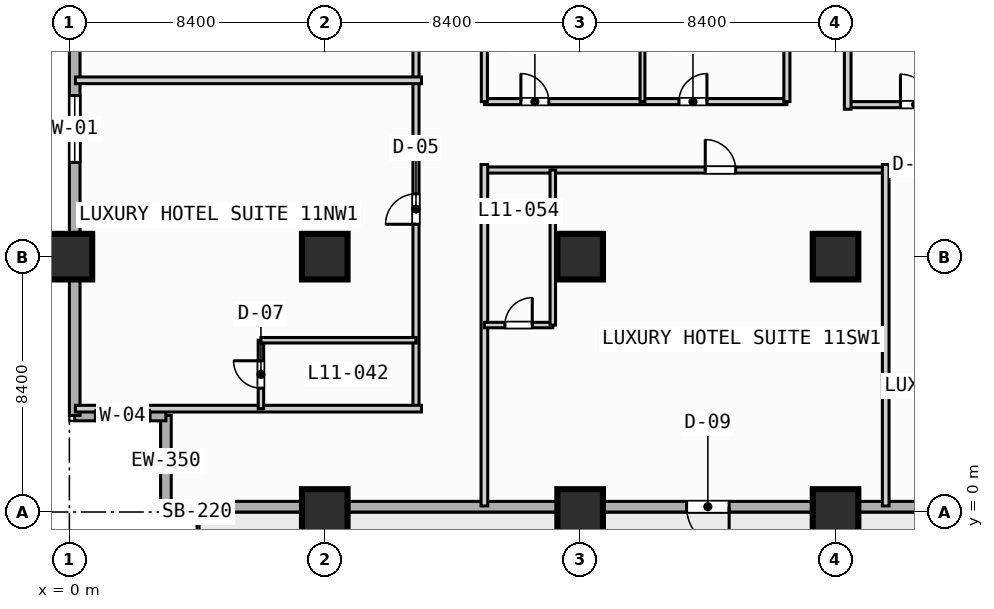
"""IFC4 building model, lengths in metres.
Left out: names, types, materials, properties, quantities, classifications, styles, units other than length and angle.
Written with IfcOpenShell. Run it as: python <this file> out.ifc"""

import sys

from ifc_helpers import new_model, si_unit, direction, frame, frame_2d, origin, origin_2d, place, context, subcontext, project, spatial, rectangle, extrude, element, fill, save


model = new_model("IFC4")
c1 = context("Model", 3, precision=1e-05, world=origin(), true_north=direction((0.0, 1.0)))
c2 = subcontext(c1, "Body", "Model", "MODEL_VIEW")
j1 = project(units=[si_unit("LENGTHUNIT", "METRE"), si_unit("PLANEANGLEUNIT", "RADIAN")], contexts=[c1])
p1 = place(None, origin())
s1 = spatial("IfcSite", under=j1, at=p1, CompositionType="ELEMENT")
p2 = place(p1, origin())
s2 = spatial("IfcBuilding", under=s1, at=p2, CompositionType="ELEMENT")
p3 = place(p2, frame((0.0, 0.0, 51.0)))
s3 = spatial("IfcBuildingStorey", under=s2, at=p3, CompositionType="ELEMENT", Elevation=51.0)
for number, where, z_axis, x_axis in (
    (1, (0.0, 8.4, 0.0), (0.0, 0.0, 1.0), (1.0, 0.0, 0.0)),
    (2, (8.4, 0.0, 0.0), (0.0, 0.0, 1.0), (1.0, 0.0, 0.0)),
    (3, (8.4, 8.4, 0.0), (0.0, 0.0, 1.0), (1.0, 0.0, 0.0)),
    (4, (16.8, 0.0, 0.0), (0.0, 0.0, 1.0), (1.0, 0.0, 0.0)),
    (5, (16.8, 8.4, 0.0), (0.0, 0.0, 1.0), (1.0, 0.0, 0.0)),
    (6, (25.2, 0.0, 0.0), (0.0, 0.0, 1.0), (1.0, 0.0, 0.0)),
    (7, (25.2, 8.4, 0.0), (0.0, 0.0, 1.0), (1.0, 0.0, 0.0)),
):
    element("IfcColumn", number, at=place(p3, frame(where, z_axis=z_axis, x_axis=x_axis)), inside=s3, PredefinedType="COLUMN", context=c2, shape_type="SweptSolid", body=[
        extrude(rectangle(XDim=1.5, YDim=1.5, at=origin_2d()), origin(), (0.0, 0.0, 1.0), 3.8),
    ])
p4 = place(p3, frame((3.175, 0.175, 0.0), z_axis=(0.0, 0.0, 1.0), x_axis=(0.0, 1.0, 0.0)))
e8 = element("IfcWall", 8, at=p4, inside=s3, PredefinedType="STANDARD", context=c2, shape_type="SweptSolid", body=[
    extrude(rectangle(XDim=3.0, YDim=0.35, at=frame_2d((1.5, 0.0))), origin(), (0.0, 0.0, 1.0), 3.55),
])
p5 = place(p3, frame((3.175, 3.175, 0.0), z_axis=(0.0, 0.0, 1.0), x_axis=(-1.0, 0.0, 0.0)))
e9 = element("IfcWall", 9, at=p5, inside=s3, PredefinedType="STANDARD", context=c2, shape_type="SweptSolid", body=[
    extrude(rectangle(XDim=3.0, YDim=0.35, at=frame_2d((1.5, 0.0))), origin(), (0.0, 0.0, 1.0), 3.55),
])
p6 = place(p5, frame((0.522, 0.0, 0.85)))
e10 = element("IfcOpeningElement", 10, at=p6, cuts=e9, PredefinedType="OPENING", context=c2, shape_type="SweptSolid", body=[
    extrude(rectangle(XDim=1.8, YDim=1.8, at=frame_2d((0.9, 0.9))), frame((0.0, 0.185, 0.0), z_axis=(0.0, -1.0, 0.0), x_axis=(1.0, 0.0, 0.0)), (0.0, 0.0, 1.0), 0.37),
])
p7 = place(p3, frame((0.175, 3.175, 0.0), z_axis=(0.0, 0.0, 1.0), x_axis=(0.0, 1.0, 0.0)))
e11 = element("IfcWall", 11, at=p7, inside=s3, PredefinedType="STANDARD", context=c2, shape_type="SweptSolid", body=[
    extrude(rectangle(XDim=86.05, YDim=0.35, at=frame_2d((43.025, 0.0))), origin(), (0.0, 0.0, 1.0), 3.55),
])
p8 = place(p7, frame((42.325, 0.0, 0.0)))
e12 = element("IfcOpeningElement", 12, at=p8, cuts=e11, PredefinedType="OPENING", context=c2, shape_type="SweptSolid", body=[
    extrude(rectangle(XDim=1.4, YDim=2.2, at=frame_2d((0.7, 1.1))), frame((0.0, 0.185, 0.0), z_axis=(0.0, -1.0, 0.0), x_axis=(1.0, 0.0, 0.0)), (0.0, 0.0, 1.0), 0.37),
])
p9 = place(p7, frame((8.325, 0.0, 0.85)))
e13 = element("IfcOpeningElement", 13, at=p9, cuts=e11, PredefinedType="OPENING", context=c2, shape_type="SweptSolid", body=[
    extrude(rectangle(XDim=2.2, YDim=1.8, at=frame_2d((1.1, 0.9))), frame((0.0, 0.185, 0.0), z_axis=(0.0, -1.0, 0.0), x_axis=(1.0, 0.0, 0.0)), (0.0, 0.0, 1.0), 0.37),
])
p10 = place(p7, frame((16.725, 0.0, 0.85)))
e14 = element("IfcOpeningElement", 14, at=p10, cuts=e11, PredefinedType="OPENING", context=c2, shape_type="SweptSolid", body=[
    extrude(rectangle(XDim=2.2, YDim=1.8, at=frame_2d((1.1, 0.9))), frame((0.0, 0.185, 0.0), z_axis=(0.0, -1.0, 0.0), x_axis=(1.0, 0.0, 0.0)), (0.0, 0.0, 1.0), 0.37),
])
p11 = place(p7, frame((25.125, 0.0, 0.85)))
e15 = element("IfcOpeningElement", 15, at=p11, cuts=e11, PredefinedType="OPENING", context=c2, shape_type="SweptSolid", body=[
    extrude(rectangle(XDim=2.2, YDim=1.8, at=frame_2d((1.1, 0.9))), frame((0.0, 0.185, 0.0), z_axis=(0.0, -1.0, 0.0), x_axis=(1.0, 0.0, 0.0)), (0.0, 0.0, 1.0), 0.37),
])
p12 = place(p7, frame((33.525, 0.0, 0.85)))
e16 = element("IfcOpeningElement", 16, at=p12, cuts=e11, PredefinedType="OPENING", context=c2, shape_type="SweptSolid", body=[
    extrude(rectangle(XDim=2.2, YDim=1.8, at=frame_2d((1.1, 0.9))), frame((0.0, 0.185, 0.0), z_axis=(0.0, -1.0, 0.0), x_axis=(1.0, 0.0, 0.0)), (0.0, 0.0, 1.0), 0.37),
])
p13 = place(p7, frame((56.675, 0.0, 0.85)))
e17 = element("IfcOpeningElement", 17, at=p13, cuts=e11, PredefinedType="OPENING", context=c2, shape_type="SweptSolid", body=[
    extrude(rectangle(XDim=1.8, YDim=1.8, at=frame_2d((0.9, 0.9))), frame((0.0, 0.185, 0.0), z_axis=(0.0, -1.0, 0.0), x_axis=(1.0, 0.0, 0.0)), (0.0, 0.0, 1.0), 0.37),
])
p14 = place(p3, frame((89.225, 0.175, 0.0), z_axis=(0.0, 0.0, 1.0), x_axis=(-1.0, 0.0, 0.0)))
e18 = element("IfcWall", 18, at=p14, inside=s3, PredefinedType="STANDARD", context=c2, shape_type="SweptSolid", body=[
    extrude(rectangle(XDim=86.05, YDim=0.35, at=frame_2d((43.025, 0.0))), origin(), (0.0, 0.0, 1.0), 3.55),
])
p15 = place(p14, frame((67.525, 0.0, 0.0)))
e19 = element("IfcOpeningElement", 19, at=p15, cuts=e18, PredefinedType="OPENING", context=c2, shape_type="SweptSolid", body=[
    extrude(rectangle(XDim=1.4, YDim=2.2, at=frame_2d((0.7, 1.1))), frame((0.0, 0.185, 0.0), z_axis=(0.0, -1.0, 0.0), x_axis=(1.0, 0.0, 0.0)), (0.0, 0.0, 1.0), 0.37),
])
p16 = place(p14, frame((58.725, 0.0, 0.85)))
e20 = element("IfcOpeningElement", 20, at=p16, cuts=e18, PredefinedType="OPENING", context=c2, shape_type="SweptSolid", body=[
    extrude(rectangle(XDim=2.2, YDim=1.8, at=frame_2d((1.1, 0.9))), frame((0.0, 0.185, 0.0), z_axis=(0.0, -1.0, 0.0), x_axis=(1.0, 0.0, 0.0)), (0.0, 0.0, 1.0), 0.37),
])
p17 = place(p14, frame((41.925, 0.0, 0.85)))
e21 = element("IfcOpeningElement", 21, at=p17, cuts=e18, PredefinedType="OPENING", context=c2, shape_type="SweptSolid", body=[
    extrude(rectangle(XDim=2.2, YDim=1.8, at=frame_2d((1.1, 0.9))), frame((0.0, 0.185, 0.0), z_axis=(0.0, -1.0, 0.0), x_axis=(1.0, 0.0, 0.0)), (0.0, 0.0, 1.0), 0.37),
])
p18 = place(p14, frame((33.525, 0.0, 0.85)))
e22 = element("IfcOpeningElement", 22, at=p18, cuts=e18, PredefinedType="OPENING", context=c2, shape_type="SweptSolid", body=[
    extrude(rectangle(XDim=2.2, YDim=1.8, at=frame_2d((1.1, 0.9))), frame((0.0, 0.185, 0.0), z_axis=(0.0, -1.0, 0.0), x_axis=(1.0, 0.0, 0.0)), (0.0, 0.0, 1.0), 0.37),
])
p19 = place(p14, frame((16.725, 0.0, 0.85)))
e23 = element("IfcOpeningElement", 23, at=p19, cuts=e18, PredefinedType="OPENING", context=c2, shape_type="SweptSolid", body=[
    extrude(rectangle(XDim=2.2, YDim=1.8, at=frame_2d((1.1, 0.9))), frame((0.0, 0.185, 0.0), z_axis=(0.0, -1.0, 0.0), x_axis=(1.0, 0.0, 0.0)), (0.0, 0.0, 1.0), 0.37),
])
p20 = place(p14, frame((8.325, 0.0, 0.85)))
e24 = element("IfcOpeningElement", 24, at=p20, cuts=e18, PredefinedType="OPENING", context=c2, shape_type="SweptSolid", body=[
    extrude(rectangle(XDim=2.2, YDim=1.8, at=frame_2d((1.1, 0.9))), frame((0.0, 0.185, 0.0), z_axis=(0.0, -1.0, 0.0), x_axis=(1.0, 0.0, 0.0)), (0.0, 0.0, 1.0), 0.37),
])
p21 = place(p3, frame((13.65, 13.5, 0.0), z_axis=(0.0, 0.0, 1.0), x_axis=(1.0, 0.0, 0.0)))
e25 = element("IfcWall", 25, at=p21, inside=s3, PredefinedType="PARTITIONING", context=c2, shape_type="SweptSolid", body=[
    extrude(rectangle(XDim=9.95, YDim=0.2, at=frame_2d((4.975, 0.0))), origin(), (0.0, 0.0, 1.0), 3.55),
])
p22 = place(p21, frame((1.2, 0.0, 0.0)))
e26 = element("IfcOpeningElement", 26, at=p22, cuts=e25, PredefinedType="OPENING", context=c2, shape_type="SweptSolid", body=[
    extrude(rectangle(XDim=0.92, YDim=2.1, at=frame_2d((0.46, 1.05))), frame((0.0, 0.11, 0.0), z_axis=(0.0, -1.0, 0.0), x_axis=(1.0, 0.0, 0.0)), (0.0, 0.0, 1.0), 0.22),
])
p23 = place(p21, frame((6.4, 0.0, 0.0)))
e27 = element("IfcOpeningElement", 27, at=p23, cuts=e25, PredefinedType="OPENING", context=c2, shape_type="SweptSolid", body=[
    extrude(rectangle(XDim=0.92, YDim=2.1, at=frame_2d((0.46, 1.05))), frame((0.0, 0.11, 0.0), z_axis=(0.0, -1.0, 0.0), x_axis=(1.0, 0.0, 0.0)), (0.0, 0.0, 1.0), 0.22),
])
p24 = place(p3, frame((18.85, 13.5, 0.0), z_axis=(0.0, 0.0, 1.0), x_axis=(0.0, 1.0, 0.0)))
e28 = element("IfcWall", 28, at=p24, inside=s3, PredefinedType="PARTITIONING", context=c2, shape_type="SweptSolid", body=[
    extrude(rectangle(XDim=11.5, YDim=0.16, at=frame_2d((5.75, 0.0))), origin(), (0.0, 0.0, 1.0), 3.55),
])
for number, where, z_axis, x_axis in (
    (29, (13.65, 13.5, 0.0), (0.0, 0.0, 1.0), (0.0, 1.0, 0.0)),
    (30, (23.6, 13.5, 0.0), (0.0, 0.0, 1.0), (0.0, 1.0, 0.0)),
):
    element("IfcWall", number, at=place(p3, frame(where, z_axis=z_axis, x_axis=x_axis)), inside=s3, PredefinedType="PARTITIONING", context=c2, shape_type="SweptSolid", body=[
        extrude(rectangle(XDim=11.5, YDim=0.2, at=frame_2d((5.75, 0.0))), origin(), (0.0, 0.0, 1.0), 3.55),
    ])
p25 = place(p3, frame((25.6, 13.4, 0.0), z_axis=(0.0, 0.0, 1.0), x_axis=(1.0, 0.0, 0.0)))
e31 = element("IfcWall", 31, at=p25, inside=s3, PredefinedType="PARTITIONING", context=c2, shape_type="SweptSolid", body=[
    extrude(rectangle(XDim=13.6, YDim=0.2, at=frame_2d((6.8, 0.0))), origin(), (0.0, 0.0, 1.0), 3.55),
])
p26 = place(p25, frame((1.735, 0.0, 0.0)))
e32 = element("IfcOpeningElement", 32, at=p26, cuts=e31, PredefinedType="OPENING", context=c2, shape_type="SweptSolid", body=[
    extrude(rectangle(XDim=1.0, YDim=2.15, at=frame_2d((0.5, 1.075))), frame((0.0, 0.11, 0.0), z_axis=(0.0, -1.0, 0.0), x_axis=(1.0, 0.0, 0.0)), (0.0, 0.0, 1.0), 0.22),
])
p27 = place(p25, frame((8.535, 0.0, 0.0)))
e33 = element("IfcOpeningElement", 33, at=p27, cuts=e31, PredefinedType="OPENING", context=c2, shape_type="SweptSolid", body=[
    extrude(rectangle(XDim=1.0, YDim=2.15, at=frame_2d((0.5, 1.075))), frame((0.0, 0.11, 0.0), z_axis=(0.0, -1.0, 0.0), x_axis=(1.0, 0.0, 0.0)), (0.0, 0.0, 1.0), 0.22),
])
p28 = place(p3, frame((25.6, 13.25, 0.0), z_axis=(0.0, 0.0, 1.0), x_axis=(0.0, 1.0, 0.0)))
e34 = element("IfcWall", 34, at=p28, inside=s3, PredefinedType="PARTITIONING", context=c2, shape_type="SweptSolid", body=[
    extrude(rectangle(XDim=20.18, YDim=0.22, at=frame_2d((10.09, 0.0))), origin(), (0.0, 0.0, 1.0), 3.55),
])
p29 = place(p3, frame((11.4, 3.4, 0.0), z_axis=(0.0, 0.0, 1.0), x_axis=(0.0, 1.0, 0.0)))
e35 = element("IfcWall", 35, at=p29, inside=s3, PredefinedType="PARTITIONING", context=c2, shape_type="SweptSolid", body=[
    extrude(rectangle(XDim=60.4, YDim=0.2, at=frame_2d((30.2, 0.0))), origin(), (0.0, 0.0, 1.0), 3.55),
])
p30 = place(p29, frame((6.065, 0.0, 0.0)))
e36 = element("IfcOpeningElement", 36, at=p30, cuts=e35, PredefinedType="OPENING", context=c2, shape_type="SweptSolid", body=[
    extrude(rectangle(XDim=1.0, YDim=2.15, at=frame_2d((0.5, 1.075))), frame((0.0, 0.11, 0.0), z_axis=(0.0, -1.0, 0.0), x_axis=(1.0, 0.0, 0.0)), (0.0, 0.0, 1.0), 0.22),
])
p31 = place(p29, frame((13.735, 0.0, 0.0)))
e37 = element("IfcOpeningElement", 37, at=p31, cuts=e35, PredefinedType="OPENING", context=c2, shape_type="SweptSolid", body=[
    extrude(rectangle(XDim=1.0, YDim=2.15, at=frame_2d((0.5, 1.075))), frame((0.0, 0.11, 0.0), z_axis=(0.0, -1.0, 0.0), x_axis=(1.0, 0.0, 0.0)), (0.0, 0.0, 1.0), 0.22),
])
p32 = place(p29, frame((22.96, 0.0, 0.0)))
e38 = element("IfcOpeningElement", 38, at=p32, cuts=e35, PredefinedType="OPENING", context=c2, shape_type="SweptSolid", body=[
    extrude(rectangle(XDim=1.0, YDim=2.15, at=frame_2d((0.5, 1.075))), frame((0.0, 0.11, 0.0), z_axis=(0.0, -1.0, 0.0), x_axis=(1.0, 0.0, 0.0)), (0.0, 0.0, 1.0), 0.22),
])
p33 = place(p29, frame((31.785, 0.0, 0.0)))
e39 = element("IfcOpeningElement", 39, at=p33, cuts=e35, PredefinedType="OPENING", context=c2, shape_type="SweptSolid", body=[
    extrude(rectangle(XDim=1.0, YDim=2.15, at=frame_2d((0.5, 1.075))), frame((0.0, 0.11, 0.0), z_axis=(0.0, -1.0, 0.0), x_axis=(1.0, 0.0, 0.0)), (0.0, 0.0, 1.0), 0.22),
])
p34 = place(p29, frame((42.56, 0.0, 0.0)))
e40 = element("IfcOpeningElement", 40, at=p34, cuts=e35, PredefinedType="OPENING", context=c2, shape_type="SweptSolid", body=[
    extrude(rectangle(XDim=1.0, YDim=2.15, at=frame_2d((0.5, 1.075))), frame((0.0, 0.11, 0.0), z_axis=(0.0, -1.0, 0.0), x_axis=(1.0, 0.0, 0.0)), (0.0, 0.0, 1.0), 0.22),
])
p35 = place(p29, frame((53.935, 0.0, 0.0)))
e41 = element("IfcOpeningElement", 41, at=p35, cuts=e35, PredefinedType="OPENING", context=c2, shape_type="SweptSolid", body=[
    extrude(rectangle(XDim=1.0, YDim=2.15, at=frame_2d((0.5, 1.075))), frame((0.0, 0.11, 0.0), z_axis=(0.0, -1.0, 0.0), x_axis=(1.0, 0.0, 0.0)), (0.0, 0.0, 1.0), 0.22),
])
p36 = place(p3, frame((0.2, 3.4, 0.0), z_axis=(0.0, 0.0, 1.0), x_axis=(1.0, 0.0, 0.0)))
e42 = element("IfcWall", 42, at=p36, inside=s3, PredefinedType="PARTITIONING", context=c2, shape_type="SweptSolid", body=[
    extrude(rectangle(XDim=11.38, YDim=0.22, at=frame_2d((5.69, 0.0))), origin(), (0.0, 0.0, 1.0), 3.55),
])
p37 = place(p3, frame((6.3, 3.4, 0.0), z_axis=(0.0, 0.0, 1.0), x_axis=(0.0, 1.0, 0.0)))
e43 = element("IfcWall", 43, at=p37, inside=s3, PredefinedType="PLUMBINGWALL", context=c2, shape_type="SweptSolid", body=[
    extrude(rectangle(XDim=2.25, YDim=0.18, at=frame_2d((1.125, 0.0))), origin(), (0.0, 0.0, 1.0), 3.55),
])
p38 = place(p37, frame((0.675, 0.0, 0.0)))
e44 = element("IfcOpeningElement", 44, at=p38, cuts=e43, PredefinedType="OPENING", context=c2, shape_type="SweptSolid", body=[
    extrude(rectangle(XDim=0.9, YDim=2.1, at=frame_2d((0.45, 1.05))), frame((0.0, 0.1, 0.0), z_axis=(0.0, -1.0, 0.0), x_axis=(1.0, 0.0, 0.0)), (0.0, 0.0, 1.0), 0.2),
])
p39 = place(p3, frame((6.3, 5.65, 0.0), z_axis=(0.0, 0.0, 1.0), x_axis=(1.0, 0.0, 0.0)))
e45 = element("IfcWall", 45, at=p39, inside=s3, PredefinedType="PLUMBINGWALL", context=c2, shape_type="SweptSolid", body=[
    extrude(rectangle(XDim=5.1, YDim=0.18, at=frame_2d((2.55, 0.0))), origin(), (0.0, 0.0, 1.0), 3.55),
])
p40 = place(p3, frame((0.2, 14.2, 0.0), z_axis=(0.0, 0.0, 1.0), x_axis=(1.0, 0.0, 0.0)))
e46 = element("IfcWall", 46, at=p40, inside=s3, PredefinedType="PARTITIONING", context=c2, shape_type="SweptSolid", body=[
    extrude(rectangle(XDim=11.38, YDim=0.22, at=frame_2d((5.69, 0.0))), origin(), (0.0, 0.0, 1.0), 3.55),
])
p41 = place(p3, frame((13.65, 11.25, 0.0), z_axis=(0.0, 0.0, 1.0), x_axis=(1.0, 0.0, 0.0)))
e47 = element("IfcWall", 47, at=p41, inside=s3, PredefinedType="PARTITIONING", context=c2, shape_type="SweptSolid", body=[
    extrude(rectangle(XDim=75.15, YDim=0.2, at=frame_2d((37.575, 0.0))), origin(), (0.0, 0.0, 1.0), 3.55),
])
p42 = place(p41, frame((7.265, 0.0, 0.0)))
e48 = element("IfcOpeningElement", 48, at=p42, cuts=e47, PredefinedType="OPENING", context=c2, shape_type="SweptSolid", body=[
    extrude(rectangle(XDim=1.0, YDim=2.15, at=frame_2d((0.5, 1.075))), frame((0.0, 0.11, 0.0), z_axis=(0.0, -1.0, 0.0), x_axis=(1.0, 0.0, 0.0)), (0.0, 0.0, 1.0), 0.22),
])
p43 = place(p41, frame((17.135, 0.0, 0.0)))
e49 = element("IfcOpeningElement", 49, at=p43, cuts=e47, PredefinedType="OPENING", context=c2, shape_type="SweptSolid", body=[
    extrude(rectangle(XDim=1.0, YDim=2.15, at=frame_2d((0.5, 1.075))), frame((0.0, 0.11, 0.0), z_axis=(0.0, -1.0, 0.0), x_axis=(1.0, 0.0, 0.0)), (0.0, 0.0, 1.0), 0.22),
])
p44 = place(p41, frame((31.665, 0.0, 0.0)))
e50 = element("IfcOpeningElement", 50, at=p44, cuts=e47, PredefinedType="OPENING", context=c2, shape_type="SweptSolid", body=[
    extrude(rectangle(XDim=1.0, YDim=2.15, at=frame_2d((0.5, 1.075))), frame((0.0, 0.11, 0.0), z_axis=(0.0, -1.0, 0.0), x_axis=(1.0, 0.0, 0.0)), (0.0, 0.0, 1.0), 0.22),
])
p45 = place(p41, frame((41.535, 0.0, 0.0)))
e51 = element("IfcOpeningElement", 51, at=p45, cuts=e47, PredefinedType="OPENING", context=c2, shape_type="SweptSolid", body=[
    extrude(rectangle(XDim=1.0, YDim=2.15, at=frame_2d((0.5, 1.075))), frame((0.0, 0.11, 0.0), z_axis=(0.0, -1.0, 0.0), x_axis=(1.0, 0.0, 0.0)), (0.0, 0.0, 1.0), 0.22),
])
p46 = place(p41, frame((56.065, 0.0, 0.0)))
e52 = element("IfcOpeningElement", 52, at=p46, cuts=e47, PredefinedType="OPENING", context=c2, shape_type="SweptSolid", body=[
    extrude(rectangle(XDim=1.0, YDim=2.15, at=frame_2d((0.5, 1.075))), frame((0.0, 0.11, 0.0), z_axis=(0.0, -1.0, 0.0), x_axis=(1.0, 0.0, 0.0)), (0.0, 0.0, 1.0), 0.22),
])
p47 = place(p41, frame((66.91, 0.0, 0.0)))
e53 = element("IfcOpeningElement", 53, at=p47, cuts=e47, PredefinedType="OPENING", context=c2, shape_type="SweptSolid", body=[
    extrude(rectangle(XDim=1.0, YDim=2.15, at=frame_2d((0.5, 1.075))), frame((0.0, 0.11, 0.0), z_axis=(0.0, -1.0, 0.0), x_axis=(1.0, 0.0, 0.0)), (0.0, 0.0, 1.0), 0.22),
])
p48 = place(p3, frame((13.65, 0.2, 0.0), z_axis=(0.0, 0.0, 1.0), x_axis=(0.0, 1.0, 0.0)))
e54 = element("IfcWall", 54, at=p48, inside=s3, PredefinedType="PARTITIONING", context=c2, shape_type="SweptSolid", body=[
    extrude(rectangle(XDim=11.23, YDim=0.22, at=frame_2d((5.615, 0.0))), origin(), (0.0, 0.0, 1.0), 3.55),
])
p49 = place(p3, frame((13.65, 6.15, 0.0), z_axis=(0.0, 0.0, 1.0), x_axis=(1.0, 0.0, 0.0)))
e55 = element("IfcWall", 55, at=p49, inside=s3, PredefinedType="PLUMBINGWALL", context=c2, shape_type="SweptSolid", body=[
    extrude(rectangle(XDim=2.25, YDim=0.18, at=frame_2d((1.125, 0.0))), origin(), (0.0, 0.0, 1.0), 3.55),
])
p50 = place(p49, frame((0.675, 0.0, 0.0)))
e56 = element("IfcOpeningElement", 56, at=p50, cuts=e55, PredefinedType="OPENING", context=c2, shape_type="SweptSolid", body=[
    extrude(rectangle(XDim=0.9, YDim=2.1, at=frame_2d((0.45, 1.05))), frame((0.0, 0.1, 0.0), z_axis=(0.0, -1.0, 0.0), x_axis=(1.0, 0.0, 0.0)), (0.0, 0.0, 1.0), 0.2),
])
p51 = place(p3, frame((15.9, 6.15, 0.0), z_axis=(0.0, 0.0, 1.0), x_axis=(0.0, 1.0, 0.0)))
e57 = element("IfcWall", 57, at=p51, inside=s3, PredefinedType="PLUMBINGWALL", context=c2, shape_type="SweptSolid", body=[
    extrude(rectangle(XDim=5.1, YDim=0.18, at=frame_2d((2.55, 0.0))), origin(), (0.0, 0.0, 1.0), 3.55),
])
p52 = place(p3, frame((26.85, 0.2, 0.0), z_axis=(0.0, 0.0, 1.0), x_axis=(0.0, 1.0, 0.0)))
e58 = element("IfcWall", 58, at=p52, inside=s3, PredefinedType="PARTITIONING", context=c2, shape_type="SweptSolid", body=[
    extrude(rectangle(XDim=11.23, YDim=0.22, at=frame_2d((5.615, 0.0))), origin(), (0.0, 0.0, 1.0), 3.55),
])
p53 = place(p6, origin())
e59 = element("IfcWindow", 59, at=p53, inside=s3, PartitioningType="SINGLE_PANEL", PredefinedType="WINDOW", context=c2, shape_type="SweptSolid", body=[
    extrude(rectangle(XDim=1.8, YDim=1.8, at=frame_2d((0.9, 0.9))), frame((0.0, 0.03, 0.0), z_axis=(0.0, -1.0, 0.0), x_axis=(1.0, 0.0, 0.0)), (0.0, 0.0, 1.0), 0.06),
])
fill(e10, e59)
p54 = place(p9, origin())
e60 = element("IfcWindow", 60, at=p54, inside=s3, PartitioningType="SINGLE_PANEL", PredefinedType="WINDOW", context=c2, shape_type="SweptSolid", body=[
    extrude(rectangle(XDim=2.2, YDim=1.8, at=frame_2d((1.1, 0.9))), frame((0.0, 0.03, 0.0), z_axis=(0.0, -1.0, 0.0), x_axis=(1.0, 0.0, 0.0)), (0.0, 0.0, 1.0), 0.06),
])
fill(e13, e60)
p55 = place(p15, origin())
e61 = element("IfcDoor", 61, at=p55, inside=s3, OperationType="SINGLE_SWING_LEFT", PredefinedType="DOOR", context=c2, shape_type="SweptSolid", body=[
    extrude(rectangle(XDim=1.4, YDim=2.2, at=frame_2d((0.7, 1.1))), frame((0.0, 0.025, 0.0), z_axis=(0.0, -1.0, 0.0), x_axis=(1.0, 0.0, 0.0)), (0.0, 0.0, 1.0), 0.05),
])
fill(e19, e61)
p56 = place(p22, origin())
e62 = element("IfcDoor", 62, at=p56, inside=s3, OperationType="SINGLE_SWING_LEFT", PredefinedType="DOOR", context=c2, shape_type="SweptSolid", body=[
    extrude(rectangle(XDim=0.92, YDim=2.1, at=frame_2d((0.46, 1.05))), frame((0.0, 0.025, 0.0), z_axis=(0.0, -1.0, 0.0), x_axis=(1.0, 0.0, 0.0)), (0.0, 0.0, 1.0), 0.05),
])
fill(e26, e62)
p57 = place(p23, origin())
e63 = element("IfcDoor", 63, at=p57, inside=s3, OperationType="SINGLE_SWING_RIGHT", PredefinedType="DOOR", context=c2, shape_type="SweptSolid", body=[
    extrude(rectangle(XDim=0.92, YDim=2.1, at=frame_2d((0.46, 1.05))), frame((0.0, 0.025, 0.0), z_axis=(0.0, -1.0, 0.0), x_axis=(1.0, 0.0, 0.0)), (0.0, 0.0, 1.0), 0.05),
])
fill(e27, e63)
p58 = place(p26, origin())
e64 = element("IfcDoor", 64, at=p58, inside=s3, OperationType="SINGLE_SWING_LEFT", PredefinedType="DOOR", context=c2, shape_type="SweptSolid", body=[
    extrude(rectangle(XDim=1.0, YDim=2.15, at=frame_2d((0.5, 1.075))), frame((0.0, 0.025, 0.0), z_axis=(0.0, -1.0, 0.0), x_axis=(1.0, 0.0, 0.0)), (0.0, 0.0, 1.0), 0.05),
])
fill(e32, e64)
p59 = place(p30, origin())
e65 = element("IfcDoor", 65, at=p59, inside=s3, OperationType="SINGLE_SWING_LEFT", PredefinedType="DOOR", context=c2, shape_type="SweptSolid", body=[
    extrude(rectangle(XDim=1.0, YDim=2.15, at=frame_2d((0.5, 1.075))), frame((0.0, 0.025, 0.0), z_axis=(0.0, -1.0, 0.0), x_axis=(1.0, 0.0, 0.0)), (0.0, 0.0, 1.0), 0.05),
])
fill(e36, e65)
p60 = place(p38, origin())
e66 = element("IfcDoor", 66, at=p60, inside=s3, OperationType="SINGLE_SWING_RIGHT", PredefinedType="DOOR", context=c2, shape_type="SweptSolid", body=[
    extrude(rectangle(XDim=0.9, YDim=2.1, at=frame_2d((0.45, 1.05))), frame((0.0, 0.025, 0.0), z_axis=(0.0, -1.0, 0.0), x_axis=(1.0, 0.0, 0.0)), (0.0, 0.0, 1.0), 0.05),
])
fill(e44, e66)
p61 = place(p42, origin())
e67 = element("IfcDoor", 67, at=p61, inside=s3, OperationType="SINGLE_SWING_LEFT", PredefinedType="DOOR", context=c2, shape_type="SweptSolid", body=[
    extrude(rectangle(XDim=1.0, YDim=2.15, at=frame_2d((0.5, 1.075))), frame((0.0, 0.025, 0.0), z_axis=(0.0, -1.0, 0.0), x_axis=(1.0, 0.0, 0.0)), (0.0, 0.0, 1.0), 0.05),
])
fill(e48, e67)
p62 = place(p50, origin())
e68 = element("IfcDoor", 68, at=p62, inside=s3, OperationType="SINGLE_SWING_RIGHT", PredefinedType="DOOR", context=c2, shape_type="SweptSolid", body=[
    extrude(rectangle(XDim=0.9, YDim=2.1, at=frame_2d((0.45, 1.05))), frame((0.0, 0.025, 0.0), z_axis=(0.0, -1.0, 0.0), x_axis=(1.0, 0.0, 0.0)), (0.0, 0.0, 1.0), 0.05),
])
fill(e56, e68)
save(model, sys.argv[1])
